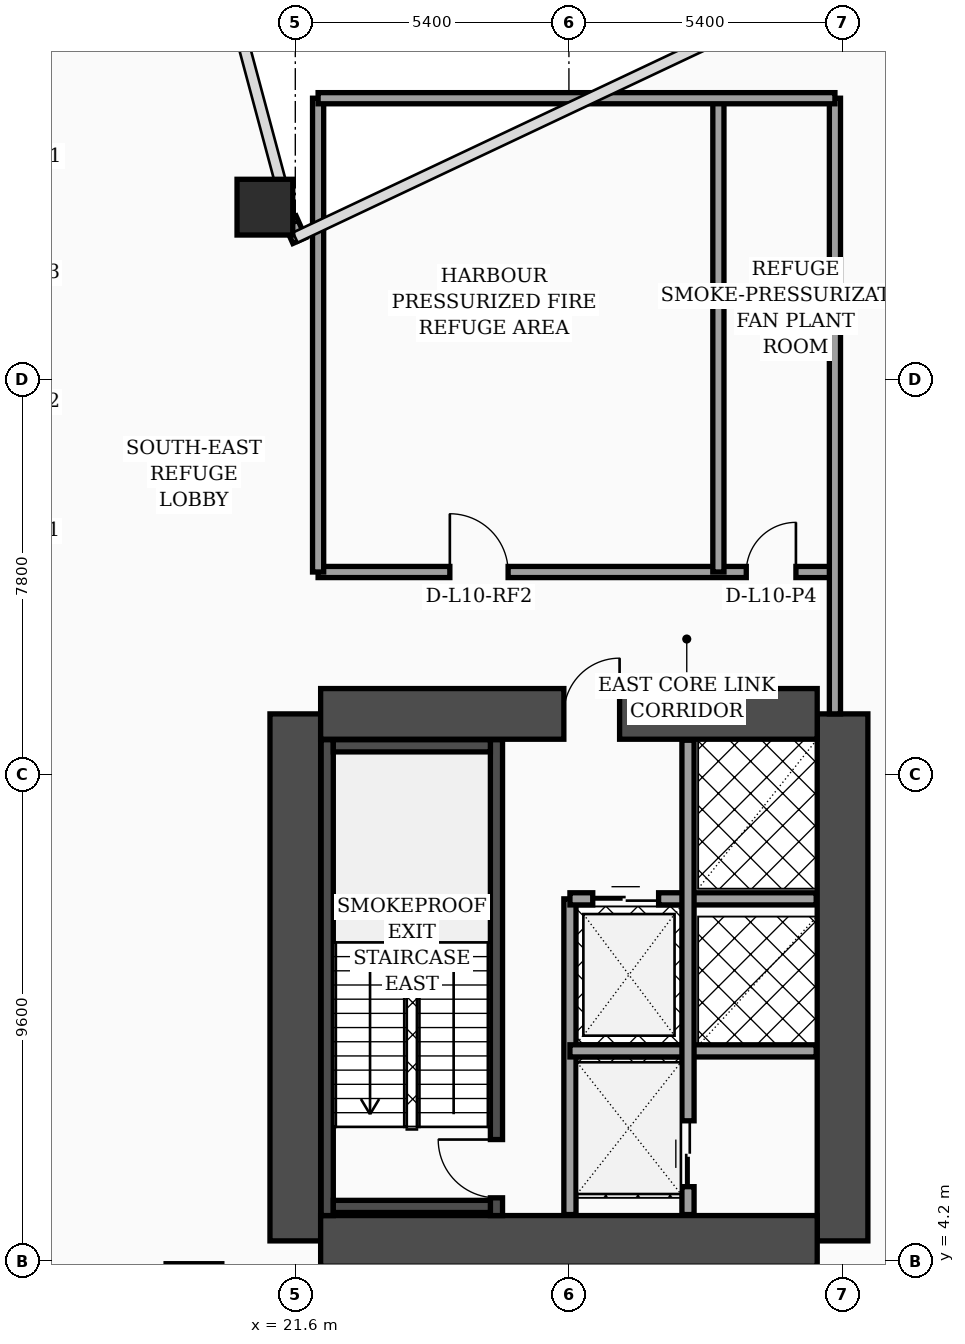
"""IFC4 building model, lengths in metres.
Left out: names, types, materials, properties, quantities, classifications, styles, units other than length and angle.
Written with IfcOpenShell. Run it as: python <this file> out.ifc"""

import sys

from ifc_helpers import new_model, si_unit, direction, frame, frame_2d, origin, origin_2d, place, context, subcontext, project, spatial, rectangle, hollow_rectangle, extrude, element, fill, save


model = new_model("IFC4")
c1 = context("Model", 3, precision=1e-05, world=origin(), true_north=direction((0.0, 1.0)))
c2 = subcontext(c1, "Body", "Model", "MODEL_VIEW")
j1 = project(units=[si_unit("LENGTHUNIT", "METRE"), si_unit("PLANEANGLEUNIT", "RADIAN")], contexts=[c1])
p1 = place(None, origin())
s1 = spatial("IfcSite", under=j1, at=p1, CompositionType="ELEMENT")
p2 = place(p1, origin())
s2 = spatial("IfcBuilding", under=s1, at=p2, CompositionType="ELEMENT")
p3 = place(p2, frame((0.0, 0.0, 46.0)))
s3 = spatial("IfcBuildingStorey", under=s2, at=p3, CompositionType="ELEMENT", Elevation=46.0)
for number, where, z_axis, x_axis in (
    (1, (21.6, 4.6, 0.0), (0.0, 0.0, 1.0), (0.0, 1.0, 0.0)),
    (2, (32.4, 4.6, 0.0), (0.0, 0.0, 1.0), (0.0, 1.0, 0.0)),
):
    element("IfcWall", number, at=place(p3, frame(where, z_axis=z_axis, x_axis=x_axis)), inside=s3, PredefinedType="SHEAR", context=c2, shape_type="SweptSolid", body=[
        extrude(rectangle(XDim=10.4, YDim=1.0, at=frame_2d((5.2, 0.0))), origin(), (0.0, 0.0, 1.0), 4.56),
    ])
p4 = place(p3, frame((22.1, 15.0, 0.0), z_axis=(0.0, 0.0, 1.0), x_axis=(1.0, 0.0, 0.0)))
e3 = element("IfcWall", 3, at=p4, inside=s3, PredefinedType="SHEAR", context=c2, shape_type="SweptSolid", body=[
    extrude(rectangle(XDim=9.8, YDim=1.0, at=frame_2d((4.9, 0.0))), origin(), (0.0, 0.0, 1.0), 4.56),
])
p5 = place(p4, frame((4.8, 0.0, 0.0)))
e4 = element("IfcOpeningElement", 4, at=p5, cuts=e3, PredefinedType="OPENING", context=c2, shape_type="SweptSolid", body=[
    extrude(rectangle(XDim=1.1, YDim=2.2, at=frame_2d((0.55, 1.1))), frame((0.0, 0.51, 0.0), z_axis=(0.0, -1.0, 0.0), x_axis=(1.0, 0.0, 0.0)), (0.0, 0.0, 1.0), 1.02),
])
p6 = place(p3, frame((22.1, 4.6, 0.0), z_axis=(0.0, 0.0, 1.0), x_axis=(1.0, 0.0, 0.0)))
e5 = element("IfcWall", 5, at=p6, inside=s3, PredefinedType="SHEAR", context=c2, shape_type="SweptSolid", body=[
    extrude(rectangle(XDim=9.8, YDim=1.0, at=frame_2d((4.9, 0.0))), origin(), (0.0, 0.0, 1.0), 4.56),
])
p7 = place(p3, frame((22.23, 5.1, 0.0), z_axis=(0.0, 0.0, 1.0), x_axis=(0.0, 1.0, 0.0)))
e6 = element("IfcWall", 6, at=p7, inside=s3, PredefinedType="SOLIDWALL", context=c2, shape_type="SweptSolid", body=[
    extrude(rectangle(XDim=9.39, YDim=0.24, at=frame_2d((4.695, 0.0))), origin(), (0.0, 0.0, 1.0), 4.56),
])
p8 = place(p3, frame((25.57, 5.1, 0.0), z_axis=(0.0, 0.0, 1.0), x_axis=(0.0, 1.0, 0.0)))
e7 = element("IfcWall", 7, at=p8, inside=s3, PredefinedType="SOLIDWALL", context=c2, shape_type="SweptSolid", body=[
    extrude(rectangle(XDim=9.39, YDim=0.24, at=frame_2d((4.695, 0.0))), origin(), (0.0, 0.0, 1.0), 4.56),
])
p9 = place(p8, frame((0.35, 0.0, 0.0)))
e8 = element("IfcOpeningElement", 8, at=p9, cuts=e7, PredefinedType="OPENING", context=c2, shape_type="SweptSolid", body=[
    extrude(rectangle(XDim=1.15, YDim=2.2, at=frame_2d((0.575, 1.1))), frame((0.0, 0.13, 0.0), z_axis=(0.0, -1.0, 0.0), x_axis=(1.0, 0.0, 0.0)), (0.0, 0.0, 1.0), 0.26),
])
for number, where, z_axis, x_axis in (
    (9, (22.35, 5.28, 0.0), (0.0, 0.0, 1.0), (1.0, 0.0, 0.0)),
    (10, (22.35, 14.37, 0.0), (0.0, 0.0, 1.0), (1.0, 0.0, 0.0)),
):
    element("IfcWall", number, at=place(p3, frame(where, z_axis=z_axis, x_axis=x_axis)), inside=s3, PredefinedType="SOLIDWALL", context=c2, shape_type="SweptSolid", body=[
        extrude(rectangle(XDim=3.1, YDim=0.24, at=frame_2d((1.55, 0.0))), origin(), (0.0, 0.0, 1.0), 4.56),
    ])
for number, where, z_axis, x_axis in (
    (11, (21.0, 25.0, 0.0), (0.0, 0.0, 1.0), (1.0, 0.0, 0.0)),
    (12, (19.6, 3.6, 0.0), (0.0, 0.0, 1.0), (1.0, 0.0, 0.0)),
):
    element("IfcColumn", number, at=place(p3, frame(where, z_axis=z_axis, x_axis=x_axis)), inside=s3, PredefinedType="COLUMN", context=c2, shape_type="SweptSolid", body=[
        extrude(hollow_rectangle(XDim=1.1, YDim=1.1, WallThickness=0.045, at=origin_2d()), origin(), (0.0, 0.0, 1.0), 4.56),
    ])
p10 = place(p3, frame((21.68, 24.34, 0.0), z_axis=(0.0, 0.0, 1.0), x_axis=(-0.40758134973, 0.913168901875, 0.0)))
e13 = element("IfcWall", 13, at=p10, inside=s3, PredefinedType="SOLIDWALL", context=c2, shape_type="SweptSolid", body=[
    extrude(rectangle(XDim=0.471, YDim=0.28, at=frame_2d((0.235, 0.0))), origin(), (0.0, 0.0, 1.0), 4.56),
])
p11 = place(p3, frame((27.02, 5.12, 0.0), z_axis=(0.0, 0.0, 1.0), x_axis=(0.0, 1.0, 0.0)))
e14 = element("IfcWall", 14, at=p11, inside=s3, PredefinedType="SOLIDWALL", context=c2, shape_type="SweptSolid", body=[
    extrude(rectangle(XDim=6.23, YDim=0.24, at=frame_2d((3.115, 0.0))), origin(), (0.0, 0.0, 1.0), 4.56),
])
p12 = place(p3, frame((27.02, 11.35, 0.0), z_axis=(0.0, 0.0, 1.0), x_axis=(1.0, 0.0, 0.0)))
e15 = element("IfcWall", 15, at=p12, inside=s3, PredefinedType="SOLIDWALL", context=c2, shape_type="SweptSolid", body=[
    extrude(rectangle(XDim=4.86, YDim=0.24, at=frame_2d((2.43, 0.0))), origin(), (0.0, 0.0, 1.0), 4.56),
])
p13 = place(p12, frame((0.45, 0.0, 0.0)))
e16 = element("IfcOpeningElement", 16, at=p13, cuts=e15, PredefinedType="OPENING", context=c2, shape_type="SweptSolid", body=[
    extrude(rectangle(XDim=1.3, YDim=2.35, at=frame_2d((0.65, 1.175))), frame((0.0, 0.13, 0.0), z_axis=(0.0, -1.0, 0.0), x_axis=(1.0, 0.0, 0.0)), (0.0, 0.0, 1.0), 0.26),
])
p14 = place(p3, frame((27.02, 8.35, 0.0), z_axis=(0.0, 0.0, 1.0), x_axis=(1.0, 0.0, 0.0)))
e17 = element("IfcWall", 17, at=p14, inside=s3, PredefinedType="SOLIDWALL", context=c2, shape_type="SweptSolid", body=[
    extrude(rectangle(XDim=4.86, YDim=0.24, at=frame_2d((2.43, 0.0))), origin(), (0.0, 0.0, 1.0), 4.09),
])
p15 = place(p3, frame((29.35, 5.12, 0.0), z_axis=(0.0, 0.0, 1.0), x_axis=(0.0, 1.0, 0.0)))
e18 = element("IfcWall", 18, at=p15, inside=s3, PredefinedType="SOLIDWALL", context=c2, shape_type="SweptSolid", body=[
    extrude(rectangle(XDim=9.36, YDim=0.24, at=frame_2d((4.68, 0.0))), origin(), (0.0, 0.0, 1.0), 4.56),
])
p16 = place(p15, frame((0.55, 0.0, 0.0)))
e19 = element("IfcOpeningElement", 19, at=p16, cuts=e18, PredefinedType="OPENING", context=c2, shape_type="SweptSolid", body=[
    extrude(rectangle(XDim=1.3, YDim=2.35, at=frame_2d((0.65, 1.175))), frame((0.0, 0.13, 0.0), z_axis=(0.0, -1.0, 0.0), x_axis=(1.0, 0.0, 0.0)), (0.0, 0.0, 1.0), 0.26),
])
p17 = place(p3, frame((22.05, 17.8, 0.0), z_axis=(0.0, 0.0, 1.0), x_axis=(1.0, 0.0, 0.0)))
e20 = element("IfcWall", 20, at=p17, inside=s3, PredefinedType="SOLIDWALL", context=c2, shape_type="SweptSolid", body=[
    extrude(rectangle(XDim=10.2, YDim=0.22, at=frame_2d((5.1, 0.0))), origin(), (0.0, 0.0, 1.0), 3.84),
])
p18 = place(p17, frame((2.6, 0.0, 0.0)))
e21 = element("IfcOpeningElement", 21, at=p18, cuts=e20, PredefinedType="OPENING", context=c2, shape_type="SweptSolid", body=[
    extrude(rectangle(XDim=1.15, YDim=2.2, at=frame_2d((0.575, 1.1))), frame((0.0, 0.12, 0.0), z_axis=(0.0, -1.0, 0.0), x_axis=(1.0, 0.0, 0.0)), (0.0, 0.0, 1.0), 0.24),
])
p19 = place(p17, frame((8.45, 0.0, 0.0)))
e22 = element("IfcOpeningElement", 22, at=p19, cuts=e20, PredefinedType="OPENING", context=c2, shape_type="SweptSolid", body=[
    extrude(rectangle(XDim=0.98, YDim=2.15, at=frame_2d((0.49, 1.075))), frame((0.0, 0.12, 0.0), z_axis=(0.0, -1.0, 0.0), x_axis=(1.0, 0.0, 0.0)), (0.0, 0.0, 1.0), 0.24),
])
p20 = place(p3, frame((29.95, 17.8, 0.0), z_axis=(0.0, 0.0, 1.0), x_axis=(0.0, 1.0, 0.0)))
e23 = element("IfcWall", 23, at=p20, inside=s3, PredefinedType="SOLIDWALL", context=c2, shape_type="SweptSolid", body=[
    extrude(rectangle(XDim=9.35, YDim=0.22, at=frame_2d((4.675, 0.0))), origin(), (0.0, 0.0, 1.0), 3.84),
])
p21 = place(p3, frame((22.05, 17.8, 0.0), z_axis=(0.0, 0.0, 1.0), x_axis=(0.0, 1.0, 0.0)))
e24 = element("IfcWall", 24, at=p21, inside=s3, PredefinedType="SOLIDWALL", context=c2, shape_type="SweptSolid", body=[
    extrude(rectangle(XDim=9.35, YDim=0.22, at=frame_2d((4.675, 0.0))), origin(), (0.0, 0.0, 1.0), 4.04),
])
p22 = place(p3, frame((32.25, 15.0, 0.0), z_axis=(0.0, 0.0, 1.0), x_axis=(0.0, 1.0, 0.0)))
e25 = element("IfcWall", 25, at=p22, inside=s3, PredefinedType="SOLIDWALL", context=c2, shape_type="SweptSolid", body=[
    extrude(rectangle(XDim=12.15, YDim=0.22, at=frame_2d((6.075, 0.0))), origin(), (0.0, 0.0, 1.0), 3.84),
])
p23 = place(p3, frame((22.05, 27.15, 0.0), z_axis=(0.0, 0.0, 1.0), x_axis=(1.0, 0.0, 0.0)))
e26 = element("IfcWall", 26, at=p23, inside=s3, PredefinedType="SOLIDWALL", context=c2, shape_type="SweptSolid", body=[
    extrude(rectangle(XDim=10.2, YDim=0.22, at=frame_2d((5.1, 0.0))), origin(), (0.0, 0.0, 1.0), 4.04),
])
p24 = place(p13, origin())
e27 = element("IfcDoor", 27, at=p24, inside=s3, OperationType="DOUBLE_DOOR_SLIDING", PredefinedType="DOOR", context=c2, shape_type="SweptSolid", body=[
    extrude(rectangle(XDim=1.3, YDim=2.35, at=frame_2d((0.65, 1.175))), frame((0.0, 0.025, 0.0), z_axis=(0.0, -1.0, 0.0), x_axis=(1.0, 0.0, 0.0)), (0.0, 0.0, 1.0), 0.05),
])
fill(e16, e27)
p25 = place(p16, origin())
e28 = element("IfcDoor", 28, at=p25, inside=s3, OperationType="DOUBLE_DOOR_SLIDING", PredefinedType="DOOR", context=c2, shape_type="SweptSolid", body=[
    extrude(rectangle(XDim=1.3, YDim=2.35, at=frame_2d((0.65, 1.175))), frame((0.0, 0.025, 0.0), z_axis=(0.0, -1.0, 0.0), x_axis=(1.0, 0.0, 0.0)), (0.0, 0.0, 1.0), 0.05),
])
fill(e19, e28)
p26 = place(p18, origin())
e29 = element("IfcDoor", 29, at=p26, inside=s3, OperationType="SINGLE_SWING_LEFT", PredefinedType="DOOR", context=c2, shape_type="SweptSolid", body=[
    extrude(rectangle(XDim=1.15, YDim=2.2, at=frame_2d((0.575, 1.1))), frame((0.0, 0.025, 0.0), z_axis=(0.0, -1.0, 0.0), x_axis=(1.0, 0.0, 0.0)), (0.0, 0.0, 1.0), 0.05),
])
fill(e21, e29)
p27 = place(p19, origin())
e30 = element("IfcDoor", 30, at=p27, inside=s3, OperationType="SINGLE_SWING_RIGHT", PredefinedType="DOOR", context=c2, shape_type="SweptSolid", body=[
    extrude(rectangle(XDim=0.98, YDim=2.15, at=frame_2d((0.49, 1.075))), frame((0.0, 0.025, 0.0), z_axis=(0.0, -1.0, 0.0), x_axis=(1.0, 0.0, 0.0)), (0.0, 0.0, 1.0), 0.05),
])
fill(e22, e30)
p28 = place(p9, origin())
e31 = element("IfcDoor", 31, at=p28, inside=s3, OperationType="SINGLE_SWING_RIGHT", PredefinedType="DOOR", context=c2, shape_type="SweptSolid", body=[
    extrude(rectangle(XDim=1.15, YDim=2.2, at=frame_2d((0.575, 1.1))), frame((0.0, 0.025, 0.0), z_axis=(0.0, -1.0, 0.0), x_axis=(1.0, 0.0, 0.0)), (0.0, 0.0, 1.0), 0.05),
])
fill(e8, e31)
p29 = place(p5, origin())
e32 = element("IfcDoor", 32, at=p29, inside=s3, OperationType="SINGLE_SWING_RIGHT", PredefinedType="DOOR", context=c2, shape_type="SweptSolid", body=[
    extrude(rectangle(XDim=1.1, YDim=2.2, at=frame_2d((0.55, 1.1))), frame((0.0, 0.025, 0.0), z_axis=(0.0, -1.0, 0.0), x_axis=(1.0, 0.0, 0.0)), (0.0, 0.0, 1.0), 0.05),
])
fill(e4, e32)
save(model, sys.argv[1])
